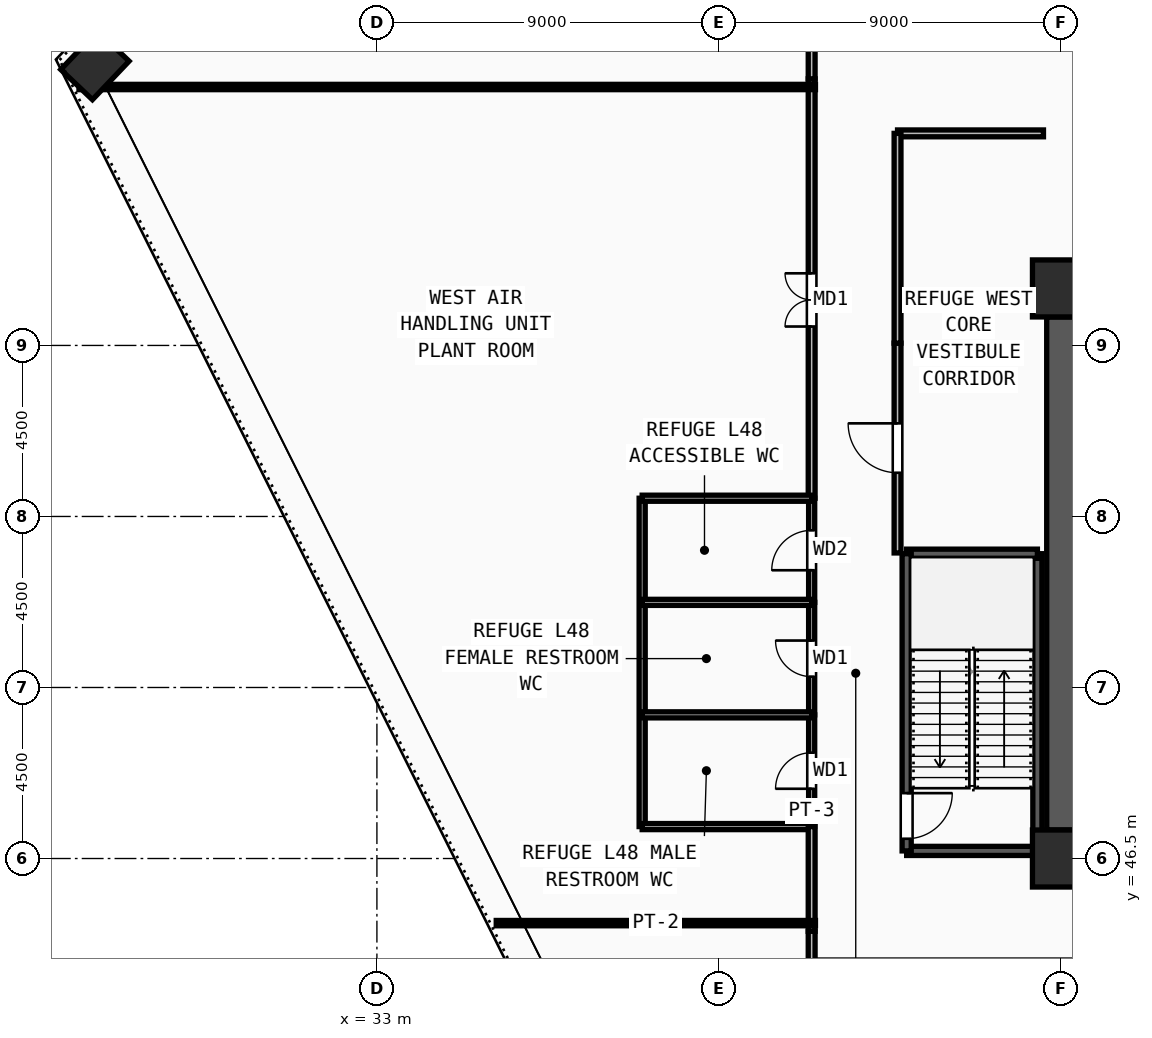
"""IFC4 building model, lengths in metres.
Left out: names, types, materials, properties, quantities, classifications, styles, units other than length and angle.
Written with IfcOpenShell. Run it as: python <this file> out.ifc"""

import sys

from ifc_helpers import new_model, si_unit, direction, frame, frame_2d, origin, origin_2d, place, context, subcontext, project, spatial, rectangle, extrude, source, transform, mapped, element, fill, save


model = new_model("IFC4")
c1 = context("Model", 3, precision=1e-05, world=origin(), true_north=direction((0.0, 1.0)))
c2 = subcontext(c1, "Body", "Model", "MODEL_VIEW")
j1 = project(units=[si_unit("LENGTHUNIT", "METRE"), si_unit("PLANEANGLEUNIT", "RADIAN")], contexts=[c1])
p1 = place(None, origin())
s1 = spatial("IfcSite", under=j1, at=p1, CompositionType="ELEMENT")
p2 = place(p1, origin())
s2 = spatial("IfcBuilding", under=s1, at=p2, CompositionType="ELEMENT")
p3 = place(p2, frame((0.0, 0.0, 185.25)))
s3 = spatial("IfcBuildingStorey", under=s2, at=p3, CompositionType="ELEMENT", Elevation=185.25)
m1 = source(origin(), c2, "Body", "SweptSolid", [
    extrude(rectangle(XDim=1.5, YDim=1.5, at=origin_2d()), origin(), (0.0, 0.0, 1.0), 4.5),
])
for number, where, z_axis, x_axis in (
    (1, (51.0, 46.5, 0.0), (0.0, 0.0, 1.0), (1.0, 0.0, 0.0)),
    (2, (51.0, 61.5, 0.0), (0.0, 0.0, 1.0), (1.0, 0.0, 0.0)),
):
    element("IfcColumn", number, at=place(p3, frame(where, z_axis=z_axis, x_axis=x_axis)), inside=s3, PredefinedType="COLUMN", context=c2, shape_type="MappedRepresentation", body=[
        mapped(m1, transform((0.0, 0.0, 0.0), x_axis=(1.0, 0.0, 0.0), y_axis=(0.0, 1.0, 0.0), z_axis=(0.0, 0.0, 1.0), scale=1.0)),
    ])
m2 = source(origin(), c2, "Body", "SweptSolid", [
    extrude(rectangle(XDim=1.4, YDim=1.15, at=origin_2d()), origin(), (0.0, 0.0, 1.0), 4.5),
])
p4 = place(p3, frame((25.58, 67.37, 0.0), z_axis=(0.0, 0.0, 1.0), x_axis=(0.68936671806, 0.724412539946, 0.0)))
e3 = element("IfcColumn", 3, at=p4, inside=s3, PredefinedType="COLUMN", context=c2, shape_type="MappedRepresentation", body=[
    mapped(m2, transform((0.0, 0.0, 0.0), x_axis=(1.0, 0.0, 0.0), y_axis=(0.0, 1.0, 0.0), z_axis=(0.0, 0.0, 1.0), scale=1.0)),
])
p5 = place(p3, frame((51.0, 47.25, 0.0), z_axis=(0.0, 0.0, 1.0), x_axis=(0.0, 1.0, 0.0)))
e4 = element("IfcWall", 4, at=p5, inside=s3, PredefinedType="SHEAR", context=c2, shape_type="SweptSolid", body=[
    extrude(rectangle(XDim=13.5, YDim=0.75, at=frame_2d((6.75, 0.0))), origin(), (0.0, 0.0, 1.0), 4.22),
])
p6 = place(p3, frame((46.94, 46.7, 0.0), z_axis=(0.0, 0.0, 1.0), x_axis=(1.0, 0.0, 0.0)))
e5 = element("IfcWall", 5, at=p6, inside=s3, PredefinedType="SOLIDWALL", context=c2, shape_type="SweptSolid", body=[
    extrude(rectangle(XDim=3.44, YDim=0.24, at=frame_2d((1.72, 0.0))), origin(), (0.0, 0.0, 1.0), 2.26),
])
p7 = place(p3, frame((50.38, 46.7, 0.0), z_axis=(0.0, 0.0, 1.0), x_axis=(0.0, 1.0, 0.0)))
e6 = element("IfcWall", 6, at=p7, inside=s3, PredefinedType="SOLIDWALL", context=c2, shape_type="SweptSolid", body=[
    extrude(rectangle(XDim=7.82, YDim=0.24, at=frame_2d((3.91, 0.0))), origin(), (0.0, 0.0, 1.0), 4.22),
])
p8 = place(p3, frame((50.38, 54.52, 0.0), z_axis=(0.0, 0.0, 1.0), x_axis=(-1.0, 0.0, 0.0)))
e7 = element("IfcWall", 7, at=p8, inside=s3, PredefinedType="SOLIDWALL", context=c2, shape_type="SweptSolid", body=[
    extrude(rectangle(XDim=3.44, YDim=0.24, at=frame_2d((1.72, 0.0))), origin(), (0.0, 0.0, 1.0), 4.22),
])
p9 = place(p3, frame((46.94, 54.52, 0.0), z_axis=(0.0, 0.0, 1.0), x_axis=(0.0, -1.0, 0.0)))
e8 = element("IfcWall", 8, at=p9, inside=s3, PredefinedType="SOLIDWALL", context=c2, shape_type="SweptSolid", body=[
    extrude(rectangle(XDim=7.82, YDim=0.24, at=frame_2d((3.91, 0.0))), origin(), (0.0, 0.0, 1.0), 4.22),
])
m3 = source(origin(), c2, "Body", "SweptSolid", [
    extrude(rectangle(XDim=1.2, YDim=2.2, at=frame_2d((0.6, 1.1))), frame((0.0, 0.13, 0.0), z_axis=(0.0, -1.0, 0.0), x_axis=(1.0, 0.0, 0.0)), (0.0, 0.0, 1.0), 0.26),
])
p10 = place(p9, frame((6.3, 0.0, 0.0)))
e9 = element("IfcOpeningElement", 9, at=p10, cuts=e8, PredefinedType="OPENING", context=c2, shape_type="MappedRepresentation", body=[
    mapped(m3, transform((0.0, 0.0, 0.0), x_axis=(1.0, 0.0, 0.0), y_axis=(0.0, 1.0, 0.0), z_axis=(0.0, 0.0, 1.0), scale=1.0)),
])
p11 = place(p3, frame((44.44, 47.34, 0.0), z_axis=(0.0, 0.0, 1.0), x_axis=(0.0, 1.0, 0.0)))
e10 = element("IfcWall", 10, at=p11, inside=s3, PredefinedType="PARTITIONING", context=c2, shape_type="SweptSolid", body=[
    extrude(rectangle(XDim=2.94, YDim=0.16, at=frame_2d((1.47, 0.0))), origin(), (0.0, 0.0, 1.0), 4.22),
])
m4 = source(origin(), c2, "Body", "SweptSolid", [
    extrude(rectangle(XDim=0.95, YDim=2.15, at=frame_2d((0.475, 1.075))), frame((0.0, 0.09, 0.0), z_axis=(0.0, -1.0, 0.0), x_axis=(1.0, 0.0, 0.0)), (0.0, 0.0, 1.0), 0.18),
])
p12 = place(p11, frame((0.995, 0.0, 0.0)))
e11 = element("IfcOpeningElement", 11, at=p12, cuts=e10, PredefinedType="OPENING", context=c2, shape_type="MappedRepresentation", body=[
    mapped(m4, transform((0.0, 0.0, 0.0), x_axis=(1.0, 0.0, 0.0), y_axis=(0.0, 1.0, 0.0), z_axis=(0.0, 0.0, 1.0), scale=1.0)),
])
p13 = place(p3, frame((44.44, 50.28, 0.0), z_axis=(0.0, 0.0, 1.0), x_axis=(0.0, 1.0, 0.0)))
e12 = element("IfcWall", 12, at=p13, inside=s3, PredefinedType="PARTITIONING", context=c2, shape_type="SweptSolid", body=[
    extrude(rectangle(XDim=2.96, YDim=0.16, at=frame_2d((1.48, 0.0))), origin(), (0.0, 0.0, 1.0), 4.22),
])
p14 = place(p13, frame((1.005, 0.0, 0.0)))
e13 = element("IfcOpeningElement", 13, at=p14, cuts=e12, PredefinedType="OPENING", context=c2, shape_type="MappedRepresentation", body=[
    mapped(m4, transform((0.0, 0.0, 0.0), x_axis=(1.0, 0.0, 0.0), y_axis=(0.0, 1.0, 0.0), z_axis=(0.0, 0.0, 1.0), scale=1.0)),
])
p15 = place(p3, frame((44.44, 53.24, 0.0), z_axis=(0.0, 0.0, 1.0), x_axis=(0.0, 1.0, 0.0)))
e14 = element("IfcWall", 14, at=p15, inside=s3, PredefinedType="PARTITIONING", context=c2, shape_type="SweptSolid", body=[
    extrude(rectangle(XDim=2.74, YDim=0.16, at=frame_2d((1.37, 0.0))), origin(), (0.0, 0.0, 1.0), 4.22),
])
m5 = source(origin(), c2, "Body", "SweptSolid", [
    extrude(rectangle(XDim=1.05, YDim=2.15, at=frame_2d((0.525, 1.075))), frame((0.0, 0.09, 0.0), z_axis=(0.0, -1.0, 0.0), x_axis=(1.0, 0.0, 0.0)), (0.0, 0.0, 1.0), 0.18),
])
p16 = place(p15, frame((0.845, 0.0, 0.0)))
e15 = element("IfcOpeningElement", 15, at=p16, cuts=e14, PredefinedType="OPENING", context=c2, shape_type="MappedRepresentation", body=[
    mapped(m5, transform((0.0, 0.0, 0.0), x_axis=(1.0, 0.0, 0.0), y_axis=(0.0, 1.0, 0.0), z_axis=(0.0, 0.0, 1.0), scale=1.0)),
])
p17 = place(p3, frame((46.7, 54.54, 0.0), z_axis=(0.0, 0.0, 1.0), x_axis=(0.0, 1.0, 0.0)))
e16 = element("IfcWall", 16, at=p17, inside=s3, PredefinedType="PARTITIONING", context=c2, shape_type="SweptSolid", body=[
    extrude(rectangle(XDim=5.52, YDim=0.18, at=frame_2d((2.76, 0.0))), origin(), (0.0, 0.0, 1.0), 4.22),
])
m6 = source(origin(), c2, "Body", "SweptSolid", [
    extrude(rectangle(XDim=1.3, YDim=2.2, at=frame_2d((0.65, 1.1))), frame((0.0, 0.1, 0.0), z_axis=(0.0, -1.0, 0.0), x_axis=(1.0, 0.0, 0.0)), (0.0, 0.0, 1.0), 0.2),
])
p18 = place(p17, frame((2.11, 0.0, 0.0)))
e17 = element("IfcOpeningElement", 17, at=p18, cuts=e16, PredefinedType="OPENING", context=c2, shape_type="MappedRepresentation", body=[
    mapped(m6, transform((0.0, 0.0, 0.0), x_axis=(1.0, 0.0, 0.0), y_axis=(0.0, 1.0, 0.0), z_axis=(0.0, 0.0, 1.0), scale=1.0)),
])
p19 = place(p3, frame((44.44, 55.98, 0.0), z_axis=(0.0, 0.0, 1.0), x_axis=(0.0, 1.0, 0.0)))
e18 = element("IfcWall", 18, at=p19, inside=s3, PredefinedType="PARTITIONING", context=c2, shape_type="SweptSolid", body=[
    extrude(rectangle(XDim=11.035, YDim=0.18, at=frame_2d((5.518, 0.0))), origin(), (0.0, 0.0, 1.0), 4.22),
])
m7 = source(origin(), c2, "Body", "SweptSolid", [
    extrude(rectangle(XDim=1.4, YDim=2.25, at=frame_2d((0.7, 1.125))), frame((0.0, 0.1, 0.0), z_axis=(0.0, -1.0, 0.0), x_axis=(1.0, 0.0, 0.0)), (0.0, 0.0, 1.0), 0.2),
])
p20 = place(p19, frame((4.518, 0.0, 0.0)))
e19 = element("IfcOpeningElement", 19, at=p20, cuts=e18, PredefinedType="OPENING", context=c2, shape_type="MappedRepresentation", body=[
    mapped(m7, transform((0.0, 0.0, 0.0), x_axis=(1.0, 0.0, 0.0), y_axis=(0.0, 1.0, 0.0), z_axis=(0.0, 0.0, 1.0), scale=1.0)),
])
p21 = place(p3, frame((39.98, 47.34, 0.0), z_axis=(0.0, 0.0, 1.0), x_axis=(0.0, 1.0, 0.0)))
e20 = element("IfcWall", 20, at=p21, inside=s3, PredefinedType="PARTITIONING", context=c2, shape_type="SweptSolid", body=[
    extrude(rectangle(XDim=8.64, YDim=0.16, at=frame_2d((4.32, 0.0))), origin(), (0.0, 0.0, 1.0), 4.22),
])
for number, where, z_axis, x_axis in (
    (21, (39.98, 47.34, 0.0), (0.0, 0.0, 1.0), (1.0, 0.0, 0.0)),
    (22, (39.98, 50.28, 0.0), (0.0, 0.0, 1.0), (1.0, 0.0, 0.0)),
    (23, (39.98, 53.24, 0.0), (0.0, 0.0, 1.0), (1.0, 0.0, 0.0)),
    (24, (39.98, 55.98, 0.0), (0.0, 0.0, 1.0), (1.0, 0.0, 0.0)),
):
    element("IfcWall", number, at=place(p3, frame(where, z_axis=z_axis, x_axis=x_axis)), inside=s3, PredefinedType="PARTITIONING", context=c2, shape_type="SweptSolid", body=[
        extrude(rectangle(XDim=4.46, YDim=0.16, at=frame_2d((2.23, 0.0))), origin(), (0.0, 0.0, 1.0), 4.22),
    ])
p22 = place(p3, frame((46.7, 65.58, 0.0), z_axis=(0.0, 0.0, 1.0), x_axis=(1.0, 0.0, 0.0)))
e25 = element("IfcWall", 25, at=p22, inside=s3, PredefinedType="PARTITIONING", context=c2, shape_type="SweptSolid", body=[
    extrude(rectangle(XDim=3.84, YDim=0.18, at=frame_2d((1.92, 0.0))), origin(), (0.0, 0.0, 1.0), 4.22),
])
p23 = place(p3, frame((46.7, 60.06, 0.0), z_axis=(0.0, 0.0, 1.0), x_axis=(0.0, 1.0, 0.0)))
e26 = element("IfcWall", 26, at=p23, inside=s3, PredefinedType="PARTITIONING", context=c2, shape_type="SweptSolid", body=[
    extrude(rectangle(XDim=5.52, YDim=0.18, at=frame_2d((2.76, 0.0))), origin(), (0.0, 0.0, 1.0), 4.22),
])
p24 = place(p3, frame((44.44, 67.015, 0.0), z_axis=(0.0, 0.0, 1.0), x_axis=(0.0, 1.0, 0.0)))
e27 = element("IfcWall", 27, at=p24, inside=s3, PredefinedType="PARTITIONING", context=c2, shape_type="SweptSolid", body=[
    extrude(rectangle(XDim=0.965, YDim=0.18, at=frame_2d((0.482, 0.0))), origin(), (0.0, 0.0, 1.0), 4.22),
])
p25 = place(p3, frame((44.44, 44.585, 0.0), z_axis=(0.0, 0.0, 1.0), x_axis=(0.0, 1.0, 0.0)))
e28 = element("IfcWall", 28, at=p25, inside=s3, PredefinedType="PARTITIONING", context=c2, shape_type="SweptSolid", body=[
    extrude(rectangle(XDim=2.755, YDim=0.18, at=frame_2d((1.377, 0.0))), origin(), (0.0, 0.0, 1.0), 4.22),
])
p26 = place(p3, frame((44.44, 43.67, 0.0), z_axis=(0.0, 0.0, 1.0), x_axis=(0.0, 1.0, 0.0)))
e29 = element("IfcWall", 29, at=p26, inside=s3, PredefinedType="PARTITIONING", context=c2, shape_type="SweptSolid", body=[
    extrude(rectangle(XDim=0.915, YDim=0.18, at=frame_2d((0.458, 0.0))), origin(), (0.0, 0.0, 1.0), 4.22),
])
p27 = place(p3, frame((44.54, 44.8, 0.0), z_axis=(0.0, 0.0, 1.0), x_axis=(-1.0, 0.0, 0.0)))
e30 = element("IfcWall", 30, at=p27, inside=s3, PredefinedType="PARTITIONING", context=c2, shape_type="SweptSolid", body=[
    extrude(rectangle(XDim=8.4, YDim=0.14, at=frame_2d((4.2, 0.0))), origin(), (0.0, 0.0, 1.0), 2.26),
])
p28 = place(p3, frame((44.54, 66.8, 0.0), z_axis=(0.0, 0.0, 1.0), x_axis=(-1.0, 0.0, 0.0)))
e31 = element("IfcWall", 31, at=p28, inside=s3, PredefinedType="PARTITIONING", context=c2, shape_type="SweptSolid", body=[
    extrude(rectangle(XDim=19.38, YDim=0.14, at=frame_2d((9.69, 0.0))), origin(), (0.0, 0.0, 1.0), 3.405),
])
m8 = source(origin(), c2, "Body", "SweptSolid", [
    extrude(rectangle(XDim=1.2, YDim=2.2, at=frame_2d((0.6, 1.1))), frame((0.0, 0.025, 0.0), z_axis=(0.0, -1.0, 0.0), x_axis=(1.0, 0.0, 0.0)), (0.0, 0.0, 1.0), 0.05),
])
p29 = place(p10, origin())
e32 = element("IfcDoor", 32, at=p29, inside=s3, OperationType="SINGLE_SWING_LEFT", PredefinedType="DOOR", context=c2, shape_type="MappedRepresentation", body=[
    mapped(m8, transform((0.0, 0.0, 0.0), x_axis=(1.0, 0.0, 0.0), y_axis=(0.0, 1.0, 0.0), z_axis=(0.0, 0.0, 1.0), scale=1.0)),
])
fill(e9, e32)
m9 = source(origin(), c2, "Body", "SweptSolid", [
    extrude(rectangle(XDim=0.95, YDim=2.15, at=frame_2d((0.475, 1.075))), frame((0.0, 0.025, 0.0), z_axis=(0.0, -1.0, 0.0), x_axis=(1.0, 0.0, 0.0)), (0.0, 0.0, 1.0), 0.05),
])
p30 = place(p12, origin())
e33 = element("IfcDoor", 33, at=p30, inside=s3, OperationType="SINGLE_SWING_LEFT", PredefinedType="DOOR", context=c2, shape_type="MappedRepresentation", body=[
    mapped(m9, transform((0.0, 0.0, 0.0), x_axis=(1.0, 0.0, 0.0), y_axis=(0.0, 1.0, 0.0), z_axis=(0.0, 0.0, 1.0), scale=1.0)),
])
fill(e11, e33)
p31 = place(p14, origin())
e34 = element("IfcDoor", 34, at=p31, inside=s3, OperationType="SINGLE_SWING_RIGHT", PredefinedType="DOOR", context=c2, shape_type="MappedRepresentation", body=[
    mapped(m9, transform((0.0, 0.0, 0.0), x_axis=(1.0, 0.0, 0.0), y_axis=(0.0, 1.0, 0.0), z_axis=(0.0, 0.0, 1.0), scale=1.0)),
])
fill(e13, e34)
m10 = source(origin(), c2, "Body", "SweptSolid", [
    extrude(rectangle(XDim=1.05, YDim=2.15, at=frame_2d((0.525, 1.075))), frame((0.0, 0.025, 0.0), z_axis=(0.0, -1.0, 0.0), x_axis=(1.0, 0.0, 0.0)), (0.0, 0.0, 1.0), 0.05),
])
p32 = place(p16, origin())
e35 = element("IfcDoor", 35, at=p32, inside=s3, OperationType="SINGLE_SWING_LEFT", PredefinedType="DOOR", context=c2, shape_type="MappedRepresentation", body=[
    mapped(m10, transform((0.0, 0.0, 0.0), x_axis=(1.0, 0.0, 0.0), y_axis=(0.0, 1.0, 0.0), z_axis=(0.0, 0.0, 1.0), scale=1.0)),
])
fill(e15, e35)
m11 = source(origin(), c2, "Body", "SweptSolid", [
    extrude(rectangle(XDim=1.3, YDim=2.2, at=frame_2d((0.65, 1.1))), frame((0.0, 0.025, 0.0), z_axis=(0.0, -1.0, 0.0), x_axis=(1.0, 0.0, 0.0)), (0.0, 0.0, 1.0), 0.05),
])
p33 = place(p18, origin())
e36 = element("IfcDoor", 36, at=p33, inside=s3, OperationType="SINGLE_SWING_RIGHT", PredefinedType="DOOR", context=c2, shape_type="MappedRepresentation", body=[
    mapped(m11, transform((0.0, 0.0, 0.0), x_axis=(1.0, 0.0, 0.0), y_axis=(0.0, 1.0, 0.0), z_axis=(0.0, 0.0, 1.0), scale=1.0)),
])
fill(e17, e36)
m12 = source(origin(), c2, "Body", "SweptSolid", [
    extrude(rectangle(XDim=1.4, YDim=2.25, at=frame_2d((0.7, 1.125))), frame((0.0, 0.025, 0.0), z_axis=(0.0, -1.0, 0.0), x_axis=(1.0, 0.0, 0.0)), (0.0, 0.0, 1.0), 0.05),
])
p34 = place(p20, origin())
e37 = element("IfcDoor", 37, at=p34, inside=s3, OperationType="DOUBLE_DOOR_SINGLE_SWING", PredefinedType="DOOR", context=c2, shape_type="MappedRepresentation", body=[
    mapped(m12, transform((0.0, 0.0, 0.0), x_axis=(1.0, 0.0, 0.0), y_axis=(0.0, 1.0, 0.0), z_axis=(0.0, 0.0, 1.0), scale=1.0)),
])
fill(e19, e37)
save(model, sys.argv[1])
